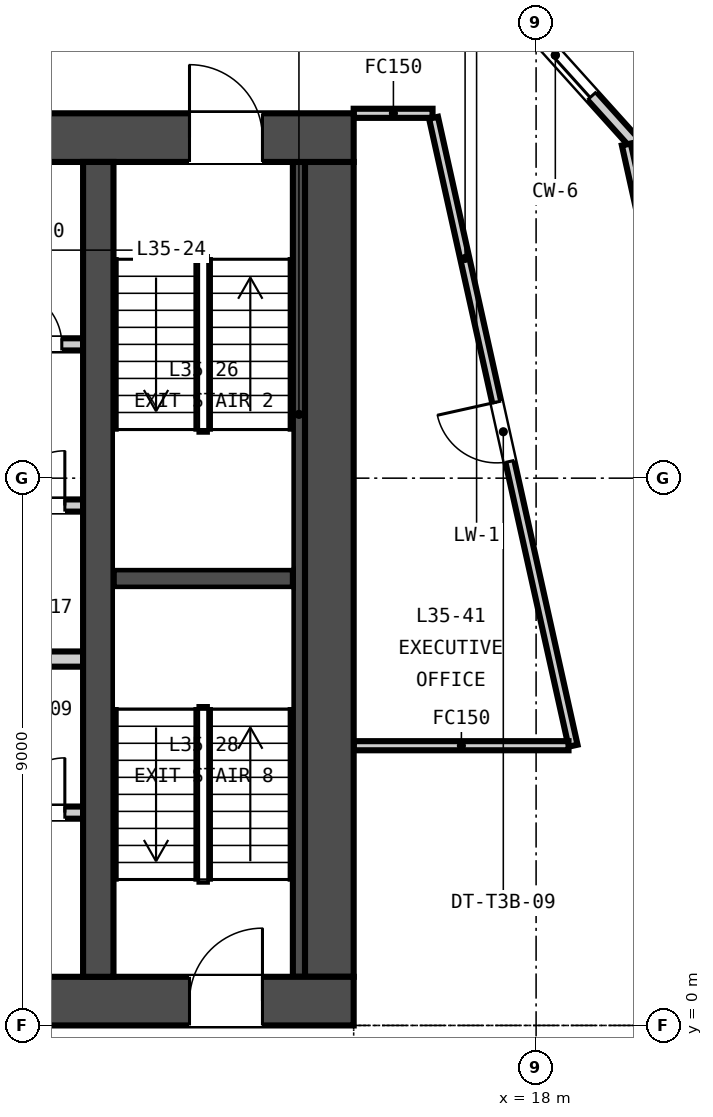
"""IFC4 building model, lengths in metres.
Left out: names, types, materials, properties, quantities, classifications, styles, units other than length and angle.
Written with IfcOpenShell. Run it as: python <this file> out.ifc"""

import sys

from ifc_helpers import new_model, si_unit, direction, frame, frame_2d, origin, place, context, subcontext, project, spatial, rectangle, extrude, element, fill, save


model = new_model("IFC4")
c1 = context("Model", 3, precision=1e-05, world=origin(), true_north=direction((0.0, 1.0)))
c2 = subcontext(c1, "Body", "Model", "MODEL_VIEW")
j1 = project(units=[si_unit("LENGTHUNIT", "METRE"), si_unit("PLANEANGLEUNIT", "RADIAN")], contexts=[c1])
p1 = place(None, origin())
s1 = spatial("IfcSite", under=j1, at=p1, CompositionType="ELEMENT")
p2 = place(p1, origin())
s2 = spatial("IfcBuilding", under=s1, at=p2, CompositionType="ELEMENT")
p3 = place(p2, frame((0.0, 0.0, 144.4)))
s3 = spatial("IfcBuildingStorey", under=s2, at=p3, CompositionType="ELEMENT", Elevation=144.4)
p4 = place(p3, frame((-15.0, 0.4, -0.15), z_axis=(0.0, 0.0, 1.0), x_axis=(1.0, 0.0, 0.0)))
e1 = element("IfcWall", 1, at=p4, inside=s3, PredefinedType="SOLIDWALL", context=c2, shape_type="SweptSolid", body=[
    extrude(rectangle(XDim=30.0, YDim=0.8, at=frame_2d((15.0, 0.0))), origin(), (0.0, 0.0, 1.0), 3.65),
])
p5 = place(p4, frame((5.8, 0.0, 0.15)))
e2 = element("IfcOpeningElement", 2, at=p5, cuts=e1, PredefinedType="OPENING", context=c2, shape_type="SweptSolid", body=[
    extrude(rectangle(XDim=2.4, YDim=2.4, at=frame_2d((1.2, 1.2))), frame((0.0, 0.41, 0.0), z_axis=(0.0, -1.0, 0.0), x_axis=(1.0, 0.0, 0.0)), (0.0, 0.0, 1.0), 0.82),
])
p6 = place(p4, frame((13.8, 0.0, 0.15)))
e3 = element("IfcOpeningElement", 3, at=p6, cuts=e1, PredefinedType="OPENING", context=c2, shape_type="SweptSolid", body=[
    extrude(rectangle(XDim=2.4, YDim=2.4, at=frame_2d((1.2, 1.2))), frame((0.0, 0.41, 0.0), z_axis=(0.0, -1.0, 0.0), x_axis=(1.0, 0.0, 0.0)), (0.0, 0.0, 1.0), 0.82),
])
p7 = place(p4, frame((21.8, 0.0, 0.15)))
e4 = element("IfcOpeningElement", 4, at=p7, cuts=e1, PredefinedType="OPENING", context=c2, shape_type="SweptSolid", body=[
    extrude(rectangle(XDim=2.4, YDim=2.4, at=frame_2d((1.2, 1.2))), frame((0.0, 0.41, 0.0), z_axis=(0.0, -1.0, 0.0), x_axis=(1.0, 0.0, 0.0)), (0.0, 0.0, 1.0), 0.82),
])
p8 = place(p4, frame((1.5, 0.0, 0.15)))
e5 = element("IfcOpeningElement", 5, at=p8, cuts=e1, PredefinedType="OPENING", context=c2, shape_type="SweptSolid", body=[
    extrude(rectangle(XDim=1.2, YDim=2.1, at=frame_2d((0.6, 1.05))), frame((0.0, 0.41, 0.0), z_axis=(0.0, -1.0, 0.0), x_axis=(1.0, 0.0, 0.0)), (0.0, 0.0, 1.0), 0.82),
])
p9 = place(p4, frame((27.3, 0.0, 0.15)))
e6 = element("IfcOpeningElement", 6, at=p9, cuts=e1, PredefinedType="OPENING", context=c2, shape_type="SweptSolid", body=[
    extrude(rectangle(XDim=1.2, YDim=2.1, at=frame_2d((0.6, 1.05))), frame((0.0, 0.41, 0.0), z_axis=(0.0, -1.0, 0.0), x_axis=(1.0, 0.0, 0.0)), (0.0, 0.0, 1.0), 0.82),
])
p10 = place(p3, frame((-15.0, 14.6, -0.15), z_axis=(0.0, 0.0, 1.0), x_axis=(1.0, 0.0, 0.0)))
e7 = element("IfcWall", 7, at=p10, inside=s3, PredefinedType="SOLIDWALL", context=c2, shape_type="SweptSolid", body=[
    extrude(rectangle(XDim=30.0, YDim=0.8, at=frame_2d((15.0, 0.0))), origin(), (0.0, 0.0, 1.0), 3.65),
])
p11 = place(p10, frame((9.25, 0.0, 0.15)))
e8 = element("IfcOpeningElement", 8, at=p11, cuts=e7, PredefinedType="OPENING", context=c2, shape_type="SweptSolid", body=[
    extrude(rectangle(XDim=1.5, YDim=2.1, at=frame_2d((0.75, 1.05))), frame((0.0, 0.41, 0.0), z_axis=(0.0, -1.0, 0.0), x_axis=(1.0, 0.0, 0.0)), (0.0, 0.0, 1.0), 0.82),
])
p12 = place(p10, frame((19.4, 0.0, 0.15)))
e9 = element("IfcOpeningElement", 9, at=p12, cuts=e7, PredefinedType="OPENING", context=c2, shape_type="SweptSolid", body=[
    extrude(rectangle(XDim=1.5, YDim=2.1, at=frame_2d((0.75, 1.05))), frame((0.0, 0.41, 0.0), z_axis=(0.0, -1.0, 0.0), x_axis=(1.0, 0.0, 0.0)), (0.0, 0.0, 1.0), 0.82),
])
p13 = place(p10, frame((1.5, 0.0, 0.15)))
e10 = element("IfcOpeningElement", 10, at=p13, cuts=e7, PredefinedType="OPENING", context=c2, shape_type="SweptSolid", body=[
    extrude(rectangle(XDim=1.2, YDim=2.1, at=frame_2d((0.6, 1.05))), frame((0.0, 0.41, 0.0), z_axis=(0.0, -1.0, 0.0), x_axis=(1.0, 0.0, 0.0)), (0.0, 0.0, 1.0), 0.82),
])
p14 = place(p10, frame((27.3, 0.0, 0.15)))
e11 = element("IfcOpeningElement", 11, at=p14, cuts=e7, PredefinedType="OPENING", context=c2, shape_type="SweptSolid", body=[
    extrude(rectangle(XDim=1.2, YDim=2.1, at=frame_2d((0.6, 1.05))), frame((0.0, 0.41, 0.0), z_axis=(0.0, -1.0, 0.0), x_axis=(1.0, 0.0, 0.0)), (0.0, 0.0, 1.0), 0.82),
])
p15 = place(p3, frame((14.6, 0.8, -0.15), z_axis=(0.0, 0.0, 1.0), x_axis=(0.0, 1.0, 0.0)))
e12 = element("IfcWall", 12, at=p15, inside=s3, PredefinedType="SOLIDWALL", context=c2, shape_type="SweptSolid", body=[
    extrude(rectangle(XDim=13.4, YDim=0.8, at=frame_2d((6.7, 0.0))), origin(), (0.0, 0.0, 1.0), 3.65),
])
p16 = place(p3, frame((10.8, 0.8, -0.15), z_axis=(0.0, 0.0, 1.0), x_axis=(0.0, 1.0, 0.0)))
e13 = element("IfcWall", 13, at=p16, inside=s3, PredefinedType="SOLIDWALL", context=c2, shape_type="SweptSolid", body=[
    extrude(rectangle(XDim=13.4, YDim=0.5, at=frame_2d((6.7, 0.0))), origin(), (0.0, 0.0, 1.0), 3.65),
])
p17 = place(p3, frame((19.721, 14.395, 0.0), z_axis=(0.0, 0.0, 1.0), x_axis=(-0.669170241733, 0.743109135712, 0.0)))
e14 = element("IfcWall", 14, at=p17, inside=s3, PredefinedType="SOLIDWALL", context=c2, shape_type="SweptSolid", body=[
    extrude(rectangle(XDim=4.2, YDim=0.2, at=frame_2d((2.1, 0.0))), origin(), (0.0, 0.0, 1.0), 2.897),
])
p18 = place(p17, frame((1.2, 0.0, 0.0)))
e15 = element("IfcOpeningElement", 15, at=p18, cuts=e14, PredefinedType="OPENING", context=c2, shape_type="SweptSolid", body=[
    extrude(rectangle(XDim=1.8, YDim=2.4, at=frame_2d((0.9, 1.2))), frame((0.0, 0.11, 0.0), z_axis=(0.0, -1.0, 0.0), x_axis=(1.0, 0.0, 0.0)), (0.0, 0.0, 1.0), 0.22),
])
p19 = place(p3, frame((-10.55, 3.5, 0.0), z_axis=(0.0, 0.0, 1.0), x_axis=(1.0, 0.0, 0.0)))
e16 = element("IfcWall", 16, at=p19, inside=s3, PredefinedType="PARTITIONING", context=c2, shape_type="SweptSolid", body=[
    extrude(rectangle(XDim=21.1, YDim=0.2, at=frame_2d((10.55, 0.0))), origin(), (0.0, 0.0, 1.0), 3.5),
])
p20 = place(p19, frame((1.113, 0.0, 0.0)))
e17 = element("IfcOpeningElement", 17, at=p20, cuts=e16, PredefinedType="OPENING", context=c2, shape_type="SweptSolid", body=[
    extrude(rectangle(XDim=1.0, YDim=2.1, at=frame_2d((0.5, 1.05))), frame((0.0, 0.11, 0.0), z_axis=(0.0, -1.0, 0.0), x_axis=(1.0, 0.0, 0.0)), (0.0, 0.0, 1.0), 0.22),
])
p21 = place(p19, frame((5.15, 0.0, 0.0)))
e18 = element("IfcOpeningElement", 18, at=p21, cuts=e16, PredefinedType="OPENING", context=c2, shape_type="SweptSolid", body=[
    extrude(rectangle(XDim=1.0, YDim=2.1, at=frame_2d((0.5, 1.05))), frame((0.0, 0.11, 0.0), z_axis=(0.0, -1.0, 0.0), x_axis=(1.0, 0.0, 0.0)), (0.0, 0.0, 1.0), 0.22),
])
p22 = place(p19, frame((9.85, 0.0, 0.0)))
e19 = element("IfcOpeningElement", 19, at=p22, cuts=e16, PredefinedType="OPENING", context=c2, shape_type="SweptSolid", body=[
    extrude(rectangle(XDim=1.0, YDim=2.1, at=frame_2d((0.5, 1.05))), frame((0.0, 0.11, 0.0), z_axis=(0.0, -1.0, 0.0), x_axis=(1.0, 0.0, 0.0)), (0.0, 0.0, 1.0), 0.22),
])
p23 = place(p19, frame((13.4, 0.0, 0.0)))
e20 = element("IfcOpeningElement", 20, at=p23, cuts=e16, PredefinedType="OPENING", context=c2, shape_type="SweptSolid", body=[
    extrude(rectangle(XDim=1.0, YDim=2.1, at=frame_2d((0.5, 1.05))), frame((0.0, 0.11, 0.0), z_axis=(0.0, -1.0, 0.0), x_axis=(1.0, 0.0, 0.0)), (0.0, 0.0, 1.0), 0.22),
])
p24 = place(p19, frame((16.762, 0.0, 0.0)))
e21 = element("IfcOpeningElement", 21, at=p24, cuts=e16, PredefinedType="OPENING", context=c2, shape_type="SweptSolid", body=[
    extrude(rectangle(XDim=1.0, YDim=2.1, at=frame_2d((0.5, 1.05))), frame((0.0, 0.11, 0.0), z_axis=(0.0, -1.0, 0.0), x_axis=(1.0, 0.0, 0.0)), (0.0, 0.0, 1.0), 0.22),
])
p25 = place(p19, frame((19.9, 0.0, 0.0)))
e22 = element("IfcOpeningElement", 22, at=p25, cuts=e16, PredefinedType="OPENING", context=c2, shape_type="SweptSolid", body=[
    extrude(rectangle(XDim=0.9, YDim=2.1, at=frame_2d((0.45, 1.05))), frame((0.0, 0.11, 0.0), z_axis=(0.0, -1.0, 0.0), x_axis=(1.0, 0.0, 0.0)), (0.0, 0.0, 1.0), 0.22),
])
p26 = place(p3, frame((-10.55, 6.025, 0.0), z_axis=(0.0, 0.0, 1.0), x_axis=(1.0, 0.0, 0.0)))
e23 = element("IfcWall", 23, at=p26, inside=s3, PredefinedType="PARTITIONING", context=c2, shape_type="SweptSolid", body=[
    extrude(rectangle(XDim=21.1, YDim=0.25, at=frame_2d((10.55, 0.0))), origin(), (0.0, 0.0, 1.0), 3.5),
])
p27 = place(p3, frame((-10.55, 8.55, 0.0), z_axis=(0.0, 0.0, 1.0), x_axis=(1.0, 0.0, 0.0)))
e24 = element("IfcWall", 24, at=p27, inside=s3, PredefinedType="PARTITIONING", context=c2, shape_type="SweptSolid", body=[
    extrude(rectangle(XDim=21.1, YDim=0.2, at=frame_2d((10.55, 0.0))), origin(), (0.0, 0.0, 1.0), 3.5),
])
p28 = place(p27, frame((0.675, 0.0, 0.0)))
e25 = element("IfcOpeningElement", 25, at=p28, cuts=e24, PredefinedType="OPENING", context=c2, shape_type="SweptSolid", body=[
    extrude(rectangle(XDim=1.2, YDim=2.1, at=frame_2d((0.6, 1.05))), frame((0.0, 0.11, 0.0), z_axis=(0.0, -1.0, 0.0), x_axis=(1.0, 0.0, 0.0)), (0.0, 0.0, 1.0), 0.22),
])
p29 = place(p27, frame((3.475, 0.0, 0.0)))
e26 = element("IfcOpeningElement", 26, at=p29, cuts=e24, PredefinedType="OPENING", context=c2, shape_type="SweptSolid", body=[
    extrude(rectangle(XDim=1.2, YDim=2.1, at=frame_2d((0.6, 1.05))), frame((0.0, 0.11, 0.0), z_axis=(0.0, -1.0, 0.0), x_axis=(1.0, 0.0, 0.0)), (0.0, 0.0, 1.0), 0.22),
])
p30 = place(p27, frame((6.275, 0.0, 0.0)))
e27 = element("IfcOpeningElement", 27, at=p30, cuts=e24, PredefinedType="OPENING", context=c2, shape_type="SweptSolid", body=[
    extrude(rectangle(XDim=1.2, YDim=2.1, at=frame_2d((0.6, 1.05))), frame((0.0, 0.11, 0.0), z_axis=(0.0, -1.0, 0.0), x_axis=(1.0, 0.0, 0.0)), (0.0, 0.0, 1.0), 0.22),
])
p31 = place(p27, frame((9.075, 0.0, 0.0)))
e28 = element("IfcOpeningElement", 28, at=p31, cuts=e24, PredefinedType="OPENING", context=c2, shape_type="SweptSolid", body=[
    extrude(rectangle(XDim=1.2, YDim=2.1, at=frame_2d((0.6, 1.05))), frame((0.0, 0.11, 0.0), z_axis=(0.0, -1.0, 0.0), x_axis=(1.0, 0.0, 0.0)), (0.0, 0.0, 1.0), 0.22),
])
p32 = place(p27, frame((11.875, 0.0, 0.0)))
e29 = element("IfcOpeningElement", 29, at=p32, cuts=e24, PredefinedType="OPENING", context=c2, shape_type="SweptSolid", body=[
    extrude(rectangle(XDim=1.2, YDim=2.1, at=frame_2d((0.6, 1.05))), frame((0.0, 0.11, 0.0), z_axis=(0.0, -1.0, 0.0), x_axis=(1.0, 0.0, 0.0)), (0.0, 0.0, 1.0), 0.22),
])
p33 = place(p27, frame((14.675, 0.0, 0.0)))
e30 = element("IfcOpeningElement", 30, at=p33, cuts=e24, PredefinedType="OPENING", context=c2, shape_type="SweptSolid", body=[
    extrude(rectangle(XDim=1.2, YDim=2.1, at=frame_2d((0.6, 1.05))), frame((0.0, 0.11, 0.0), z_axis=(0.0, -1.0, 0.0), x_axis=(1.0, 0.0, 0.0)), (0.0, 0.0, 1.0), 0.22),
])
p34 = place(p27, frame((17.475, 0.0, 0.0)))
e31 = element("IfcOpeningElement", 31, at=p34, cuts=e24, PredefinedType="OPENING", context=c2, shape_type="SweptSolid", body=[
    extrude(rectangle(XDim=1.2, YDim=2.1, at=frame_2d((0.6, 1.05))), frame((0.0, 0.11, 0.0), z_axis=(0.0, -1.0, 0.0), x_axis=(1.0, 0.0, 0.0)), (0.0, 0.0, 1.0), 0.22),
])
p35 = place(p27, frame((19.9, 0.0, 0.0)))
e32 = element("IfcOpeningElement", 32, at=p35, cuts=e24, PredefinedType="OPENING", context=c2, shape_type="SweptSolid", body=[
    extrude(rectangle(XDim=0.9, YDim=2.1, at=frame_2d((0.45, 1.05))), frame((0.0, 0.11, 0.0), z_axis=(0.0, -1.0, 0.0), x_axis=(1.0, 0.0, 0.0)), (0.0, 0.0, 1.0), 0.22),
])
p36 = place(p3, frame((5.9, 11.2, 0.0), z_axis=(0.0, 0.0, 1.0), x_axis=(1.0, 0.0, 0.0)))
e33 = element("IfcWall", 33, at=p36, inside=s3, PredefinedType="PARTITIONING", context=c2, shape_type="SweptSolid", body=[
    extrude(rectangle(XDim=4.65, YDim=0.2, at=frame_2d((2.325, 0.0))), origin(), (0.0, 0.0, 1.0), 3.5),
])
p37 = place(p36, frame((3.4, 0.0, 0.0)))
e34 = element("IfcOpeningElement", 34, at=p37, cuts=e33, PredefinedType="OPENING", context=c2, shape_type="SweptSolid", body=[
    extrude(rectangle(XDim=0.9, YDim=2.1, at=frame_2d((0.45, 1.05))), frame((0.0, 0.11, 0.0), z_axis=(0.0, -1.0, 0.0), x_axis=(1.0, 0.0, 0.0)), (0.0, 0.0, 1.0), 0.22),
])
p38 = place(p3, frame((11.05, 7.35, 0.0), z_axis=(0.0, 0.0, 1.0), x_axis=(1.0, 0.0, 0.0)))
e35 = element("IfcWall", 35, at=p38, inside=s3, PredefinedType="SOLIDWALL", context=c2, shape_type="SweptSolid", body=[
    extrude(rectangle(XDim=2.95, YDim=0.3, at=frame_2d((1.475, 0.0))), origin(), (0.0, 0.0, 1.0), 3.5),
])
p39 = place(p3, frame((14.1, 0.8, 0.0), z_axis=(0.0, 0.0, 1.0), x_axis=(0.0, 1.0, 0.0)))
e36 = element("IfcWall", 36, at=p39, inside=s3, PredefinedType="SOLIDWALL", context=c2, shape_type="SweptSolid", body=[
    extrude(rectangle(XDim=13.4, YDim=0.2, at=frame_2d((6.7, 0.0))), origin(), (0.0, 0.0, 1.0), 3.5),
])
p40 = place(p3, frame((16.297, 15.0, 0.0), z_axis=(0.0, 0.0, 1.0), x_axis=(-1.0, 0.0, 0.0)))
e37 = element("IfcWall", 37, at=p40, inside=s3, PredefinedType="PARTITIONING", context=c2, shape_type="SweptSolid", body=[
    extrude(rectangle(XDim=1.297, YDim=0.15, at=frame_2d((0.648, 0.0))), origin(), (0.0, 0.0, 1.0), 2.741),
])
p41 = place(p3, frame((18.608, 4.6, 0.0), z_axis=(0.0, 0.0, 1.0), x_axis=(-0.21691823958, 0.976189775268, 0.0)))
e38 = element("IfcWall", 38, at=p41, inside=s3, PredefinedType="PARTITIONING", context=c2, shape_type="SweptSolid", body=[
    extrude(rectangle(XDim=10.579, YDim=0.15, at=frame_2d((5.289, 0.0))), origin(), (0.0, 0.0, 1.0), 2.741),
])
p42 = place(p41, frame((4.789, 0.0, 0.0)))
e39 = element("IfcOpeningElement", 39, at=p42, cuts=e38, PredefinedType="OPENING", context=c2, shape_type="SweptSolid", body=[
    extrude(rectangle(XDim=1.0, YDim=2.1, at=frame_2d((0.5, 1.05))), frame((0.0, 0.085, 0.0), z_axis=(0.0, -1.0, 0.0), x_axis=(1.0, 0.0, 0.0)), (0.0, 0.0, 1.0), 0.17),
])
p43 = place(p3, frame((19.484, 14.487, 0.0), z_axis=(0.0, 0.0, 1.0), x_axis=(0.216857160719, -0.976203345541, 0.0)))
e40 = element("IfcWall", 40, at=p43, inside=s3, PredefinedType="PARTITIONING", context=c2, shape_type="SweptSolid", body=[
    extrude(rectangle(XDim=5.29, YDim=0.15, at=frame_2d((2.645, 0.0))), origin(), (0.0, 0.0, 1.0), 2.741),
])
p44 = place(p43, frame((2.002, 0.0, 0.0)))
e41 = element("IfcOpeningElement", 41, at=p44, cuts=e40, PredefinedType="OPENING", context=c2, shape_type="SweptSolid", body=[
    extrude(rectangle(XDim=1.0, YDim=2.1, at=frame_2d((0.5, 1.05))), frame((0.0, 0.085, 0.0), z_axis=(0.0, -1.0, 0.0), x_axis=(1.0, 0.0, 0.0)), (0.0, 0.0, 1.0), 0.17),
])
p45 = place(p3, frame((15.0, 4.6, 0.0), z_axis=(0.0, 0.0, 1.0), x_axis=(1.0, 0.0, 0.0)))
e42 = element("IfcWall", 42, at=p45, inside=s3, PredefinedType="PARTITIONING", context=c2, shape_type="SweptSolid", body=[
    extrude(rectangle(XDim=3.533, YDim=0.15, at=frame_2d((1.767, 0.0))), origin(), (0.0, 0.0, 1.0), 2.741),
])
p46 = place(p18, origin())
e43 = element("IfcDoor", 43, at=p46, inside=s3, OperationType="SINGLE_SWING_LEFT", PredefinedType="DOOR", context=c2, shape_type="SweptSolid", body=[
    extrude(rectangle(XDim=1.8, YDim=2.4, at=frame_2d((0.9, 1.2))), frame((0.0, 0.025, 0.0), z_axis=(0.0, -1.0, 0.0), x_axis=(1.0, 0.0, 0.0)), (0.0, 0.0, 1.0), 0.05),
])
fill(e15, e43)
p47 = place(p25, origin())
e44 = element("IfcDoor", 44, at=p47, inside=s3, OperationType="SINGLE_SWING_RIGHT", PredefinedType="DOOR", context=c2, shape_type="SweptSolid", body=[
    extrude(rectangle(XDim=0.9, YDim=2.1, at=frame_2d((0.45, 1.05))), frame((0.0, 0.025, 0.0), z_axis=(0.0, -1.0, 0.0), x_axis=(1.0, 0.0, 0.0)), (0.0, 0.0, 1.0), 0.05),
])
fill(e22, e44)
p48 = place(p35, origin())
e45 = element("IfcDoor", 45, at=p48, inside=s3, OperationType="SINGLE_SWING_RIGHT", PredefinedType="DOOR", context=c2, shape_type="SweptSolid", body=[
    extrude(rectangle(XDim=0.9, YDim=2.1, at=frame_2d((0.45, 1.05))), frame((0.0, 0.025, 0.0), z_axis=(0.0, -1.0, 0.0), x_axis=(1.0, 0.0, 0.0)), (0.0, 0.0, 1.0), 0.05),
])
fill(e32, e45)
p49 = place(p37, origin())
e46 = element("IfcDoor", 46, at=p49, inside=s3, OperationType="SINGLE_SWING_LEFT", PredefinedType="DOOR", context=c2, shape_type="SweptSolid", body=[
    extrude(rectangle(XDim=0.9, YDim=2.1, at=frame_2d((0.45, 1.05))), frame((0.0, 0.025, 0.0), z_axis=(0.0, -1.0, 0.0), x_axis=(1.0, 0.0, 0.0)), (0.0, 0.0, 1.0), 0.05),
])
fill(e34, e46)
p50 = place(p14, origin())
e47 = element("IfcDoor", 47, at=p50, inside=s3, OperationType="SINGLE_SWING_LEFT", PredefinedType="DOOR", context=c2, shape_type="SweptSolid", body=[
    extrude(rectangle(XDim=1.2, YDim=2.1, at=frame_2d((0.6, 1.05))), frame((0.0, 0.025, 0.0), z_axis=(0.0, -1.0, 0.0), x_axis=(1.0, 0.0, 0.0)), (0.0, 0.0, 1.0), 0.05),
])
fill(e11, e47)
p51 = place(p9, origin())
e48 = element("IfcDoor", 48, at=p51, inside=s3, OperationType="SINGLE_SWING_RIGHT", PredefinedType="DOOR", context=c2, shape_type="SweptSolid", body=[
    extrude(rectangle(XDim=1.2, YDim=2.1, at=frame_2d((0.6, 1.05))), frame((0.0, 0.025, 0.0), z_axis=(0.0, -1.0, 0.0), x_axis=(1.0, 0.0, 0.0)), (0.0, 0.0, 1.0), 0.05),
])
fill(e6, e48)
p52 = place(p42, origin())
e49 = element("IfcDoor", 49, at=p52, inside=s3, OperationType="SINGLE_SWING_RIGHT", PredefinedType="DOOR", context=c2, shape_type="SweptSolid", body=[
    extrude(rectangle(XDim=1.0, YDim=2.1, at=frame_2d((0.5, 1.05))), frame((0.0, 0.025, 0.0), z_axis=(0.0, -1.0, 0.0), x_axis=(1.0, 0.0, 0.0)), (0.0, 0.0, 1.0), 0.05),
])
fill(e39, e49)
save(model, sys.argv[1])
